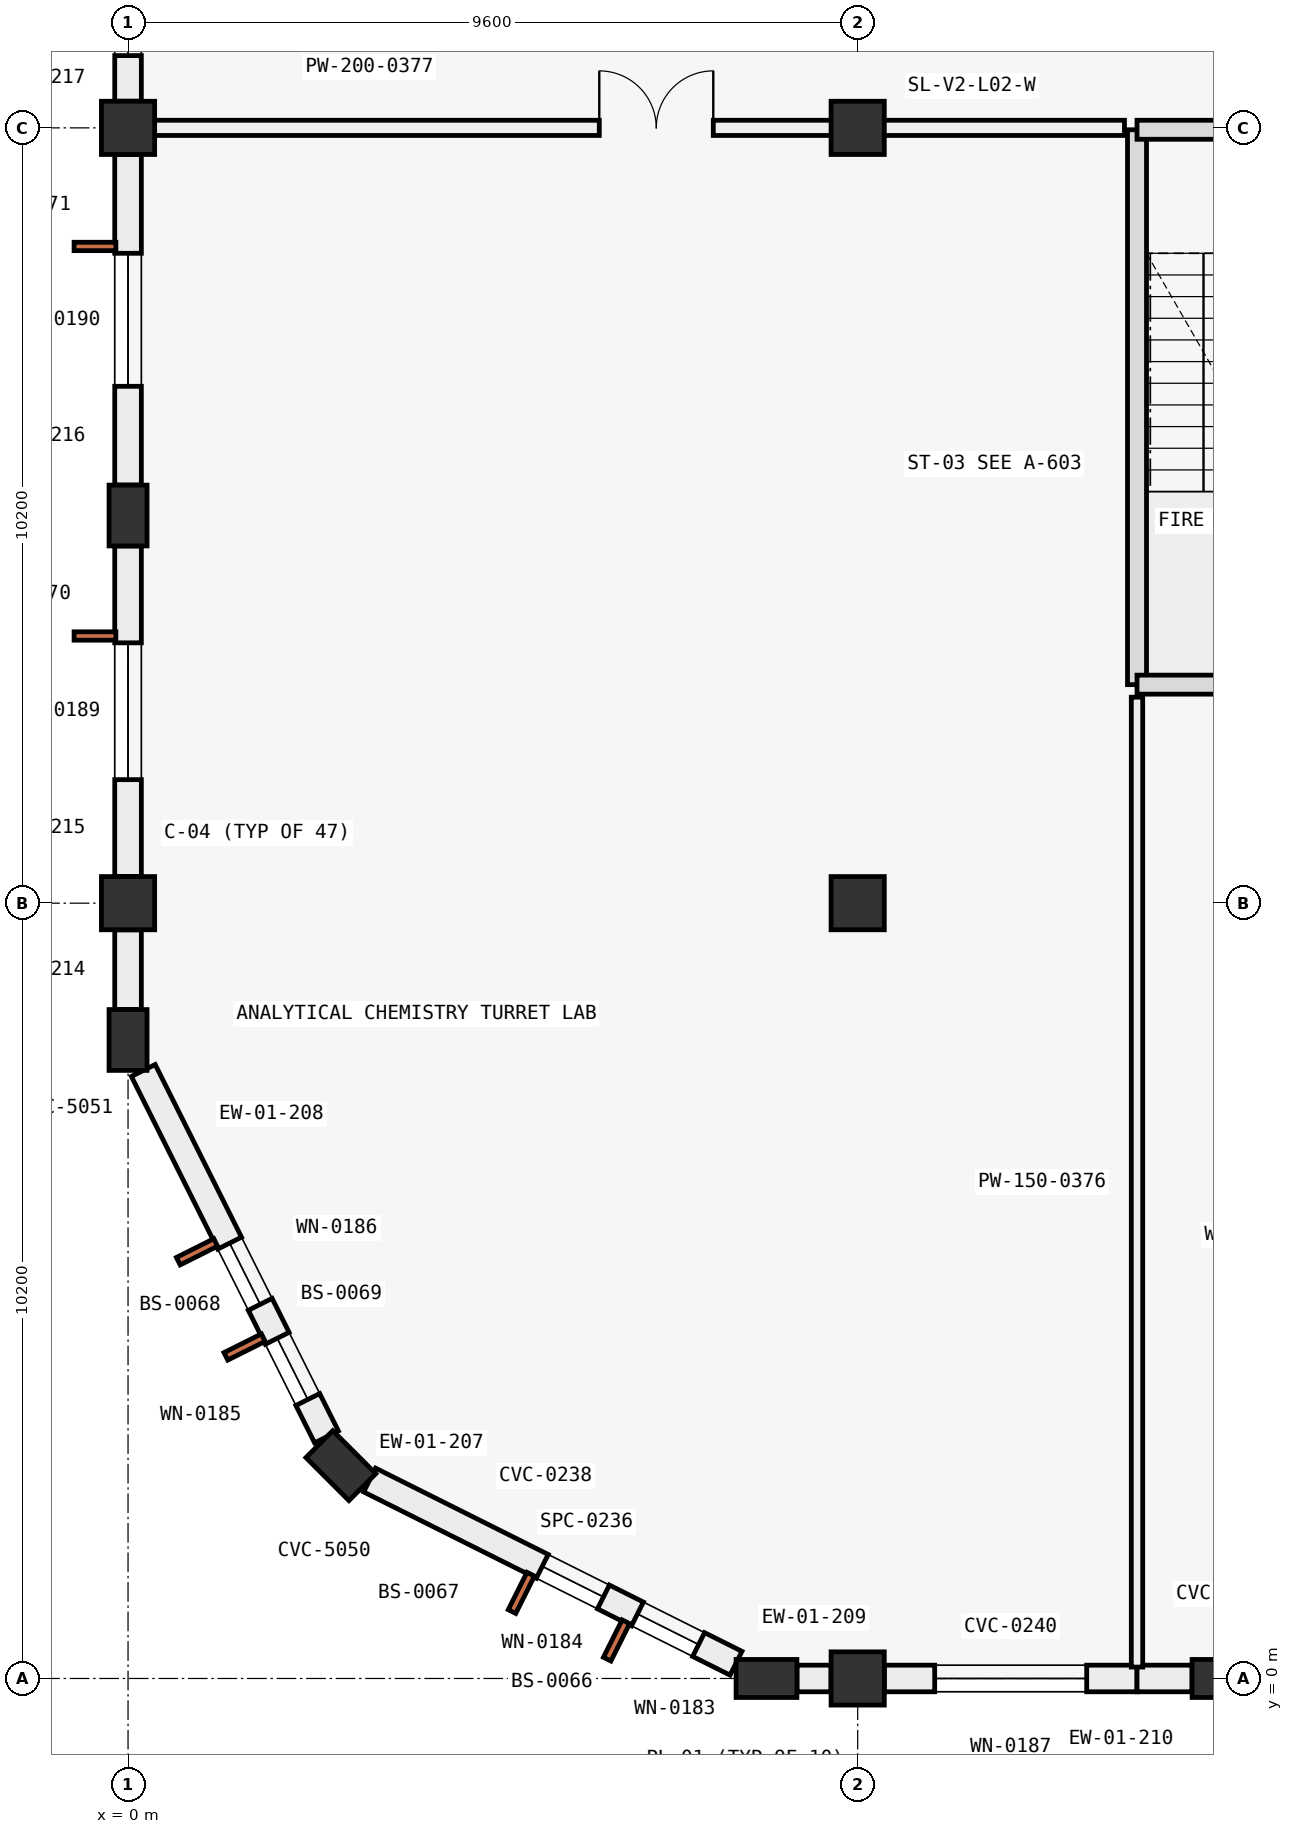
"""IFC4 building model, lengths in metres.
Left out: names, types, materials, properties, quantities, classifications, styles, units other than length and angle.
Written with IfcOpenShell. Run it as: python <this file> out.ifc"""

import sys

from ifc_helpers import new_model, si_unit, direction, frame, frame_2d, origin, origin_2d, place, context, subcontext, project, spatial, rectangle, extrude, element, fill, save


model = new_model("IFC4")
c1 = context("Model", 3, precision=1e-05, world=origin(), true_north=direction((0.0, 1.0)))
c2 = subcontext(c1, "Body", "Model", "MODEL_VIEW")
j1 = project(units=[si_unit("LENGTHUNIT", "METRE"), si_unit("PLANEANGLEUNIT", "RADIAN")], contexts=[c1])
p1 = place(None, origin())
s1 = spatial("IfcSite", under=j1, at=p1, CompositionType="ELEMENT")
p2 = place(p1, origin())
s2 = spatial("IfcBuilding", under=s1, at=p2, CompositionType="ELEMENT")
p3 = place(p2, frame((0.0, 0.0, 9.6)))
s3 = spatial("IfcBuildingStorey", under=s2, at=p3, CompositionType="ELEMENT", Elevation=9.6)
for number, where, z_axis, x_axis in (
    (1, (0.0, 10.2, 0.0), (0.0, 0.0, 1.0), (1.0, 0.0, 0.0)),
    (2, (0.0, 20.4, 0.0), (0.0, 0.0, 1.0), (1.0, 0.0, 0.0)),
    (3, (9.6, 0.0, 0.0), (0.0, 0.0, 1.0), (1.0, 0.0, 0.0)),
    (4, (9.6, 10.2, 0.0), (0.0, 0.0, 1.0), (1.0, 0.0, 0.0)),
    (5, (9.6, 20.4, 0.0), (0.0, 0.0, 1.0), (1.0, 0.0, 0.0)),
):
    element("IfcColumn", number, at=place(p3, frame(where, z_axis=z_axis, x_axis=x_axis)), inside=s3, PredefinedType="COLUMN", context=c2, shape_type="SweptSolid", body=[
        extrude(rectangle(XDim=0.7, YDim=0.7, at=origin_2d()), origin(), (0.0, 0.0, 1.0), 4.2),
    ])
for number, where, z_axis, x_axis in (
    (6, (8.4, 0.0, 0.0), (0.0, 0.0, 1.0), (0.0, 1.0, 0.0)),
    (7, (2.8, 2.8, 0.0), (0.0, 0.0, 1.0), (0.707, 0.707, 0.0)),
    (8, (0.0, 8.4, 0.0), (0.0, 0.0, 1.0), (1.0, 0.0, 0.0)),
    (9, (14.4, 0.0, 0.0), (0.0, 0.0, 1.0), (0.0, 1.0, 0.0)),
    (10, (0.0, 15.3, 0.0), (0.0, 0.0, 1.0), (1.0, 0.0, 0.0)),
):
    element("IfcColumn", number, at=place(p3, frame(where, z_axis=z_axis, x_axis=x_axis)), inside=s3, PredefinedType="PILASTER", context=c2, shape_type="SweptSolid", body=[
        extrude(rectangle(XDim=0.5, YDim=0.8, at=origin_2d()), origin(), (0.0, 0.0, 1.0), 4.2),
    ])
p4 = place(p3, frame((7.999, 0.2, 0.0), z_axis=(0.0, 0.0, 1.0), x_axis=(-0.894418132042, 0.447231712958, 0.0)))
e11 = element("IfcWall", 11, at=p4, inside=s3, PredefinedType="SOLIDWALL", context=c2, shape_type="SweptSolid", body=[
    extrude(rectangle(XDim=5.39, YDim=0.35, at=frame_2d((2.695, 0.0))), origin(), (0.0, 0.0, 1.0), 3.23),
])
p5 = place(p4, frame((0.55, 0.0, 0.7)))
e12 = element("IfcOpeningElement", 12, at=p5, cuts=e11, PredefinedType="OPENING", context=c2, shape_type="SweptSolid", body=[
    extrude(rectangle(XDim=0.9, YDim=2.2, at=frame_2d((0.45, 1.1))), frame((0.0, 0.185, 0.0), z_axis=(0.0, -1.0, 0.0), x_axis=(1.0, 0.0, 0.0)), (0.0, 0.0, 1.0), 0.37),
])
p6 = place(p4, frame((1.95, 0.0, 0.7)))
e13 = element("IfcOpeningElement", 13, at=p6, cuts=e11, PredefinedType="OPENING", context=c2, shape_type="SweptSolid", body=[
    extrude(rectangle(XDim=0.9, YDim=2.2, at=frame_2d((0.45, 1.1))), frame((0.0, 0.185, 0.0), z_axis=(0.0, -1.0, 0.0), x_axis=(1.0, 0.0, 0.0)), (0.0, 0.0, 1.0), 0.37),
])
p7 = place(p3, frame((2.611, 3.178, 0.0), z_axis=(0.0, 0.0, 1.0), x_axis=(-0.447231712958, 0.894418132042, 0.0)))
e14 = element("IfcWall", 14, at=p7, inside=s3, PredefinedType="SOLIDWALL", context=c2, shape_type="SweptSolid", body=[
    extrude(rectangle(XDim=5.39, YDim=0.35, at=frame_2d((2.695, 0.0))), origin(), (0.0, 0.0, 1.0), 3.23),
])
p8 = place(p7, frame((0.55, 0.0, 0.7)))
e15 = element("IfcOpeningElement", 15, at=p8, cuts=e14, PredefinedType="OPENING", context=c2, shape_type="SweptSolid", body=[
    extrude(rectangle(XDim=0.9, YDim=2.2, at=frame_2d((0.45, 1.1))), frame((0.0, 0.185, 0.0), z_axis=(0.0, -1.0, 0.0), x_axis=(1.0, 0.0, 0.0)), (0.0, 0.0, 1.0), 0.37),
])
p9 = place(p7, frame((1.95, 0.0, 0.7)))
e16 = element("IfcOpeningElement", 16, at=p9, cuts=e14, PredefinedType="OPENING", context=c2, shape_type="SweptSolid", body=[
    extrude(rectangle(XDim=0.9, YDim=2.2, at=frame_2d((0.45, 1.1))), frame((0.0, 0.185, 0.0), z_axis=(0.0, -1.0, 0.0), x_axis=(1.0, 0.0, 0.0)), (0.0, 0.0, 1.0), 0.37),
])
p10 = place(p3, frame((9.249, 0.0, 0.0), z_axis=(0.0, 0.0, 1.0), x_axis=(-1.0, 0.0, 0.0)))
e17 = element("IfcWall", 17, at=p10, inside=s3, PredefinedType="SOLIDWALL", context=c2, shape_type="SweptSolid", body=[
    extrude(rectangle(XDim=0.448, YDim=0.35, at=frame_2d((0.224, 0.0))), origin(), (0.0, 0.0, 1.0), 3.28),
])
p11 = place(p3, frame((13.275, 0.0, 0.0), z_axis=(0.0, 0.0, 1.0), x_axis=(-1.0, 0.0, 0.0)))
e18 = element("IfcWall", 18, at=p11, inside=s3, PredefinedType="SOLIDWALL", context=c2, shape_type="SweptSolid", body=[
    extrude(rectangle(XDim=3.324, YDim=0.35, at=frame_2d((1.662, 0.0))), origin(), (0.0, 0.0, 1.0), 2.58),
])
p12 = place(p11, frame((0.662, 0.0, 0.8)))
e19 = element("IfcOpeningElement", 19, at=p12, cuts=e18, PredefinedType="OPENING", context=c2, shape_type="SweptSolid", body=[
    extrude(rectangle(XDim=2.0, YDim=1.35, at=frame_2d((1.0, 0.675))), frame((0.0, 0.185, 0.0), z_axis=(0.0, -1.0, 0.0), x_axis=(1.0, 0.0, 0.0)), (0.0, 0.0, 1.0), 0.37),
])
p13 = place(p3, frame((13.999, 0.0, 0.0), z_axis=(0.0, 0.0, 1.0), x_axis=(-1.0, 0.0, 0.0)))
e20 = element("IfcWall", 20, at=p13, inside=s3, PredefinedType="SOLIDWALL", context=c2, shape_type="SweptSolid", body=[
    extrude(rectangle(XDim=0.724, YDim=0.35, at=frame_2d((0.362, 0.0))), origin(), (0.0, 0.0, 1.0), 2.58),
])
p14 = place(p3, frame((0.0, 8.801, 0.0), z_axis=(0.0, 0.0, 1.0), x_axis=(0.0, 1.0, 0.0)))
e21 = element("IfcWall", 21, at=p14, inside=s3, PredefinedType="SOLIDWALL", context=c2, shape_type="SweptSolid", body=[
    extrude(rectangle(XDim=1.048, YDim=0.35, at=frame_2d((0.524, 0.0))), origin(), (0.0, 0.0, 1.0), 3.28),
])
p15 = place(p3, frame((0.0, 10.551, 0.0), z_axis=(0.0, 0.0, 1.0), x_axis=(0.0, 1.0, 0.0)))
e22 = element("IfcWall", 22, at=p15, inside=s3, PredefinedType="SOLIDWALL", context=c2, shape_type="SweptSolid", body=[
    extrude(rectangle(XDim=4.348, YDim=0.35, at=frame_2d((2.174, 0.0))), origin(), (0.0, 0.0, 1.0), 3.28),
])
p16 = place(p15, frame((1.274, 0.0, 0.85)))
e23 = element("IfcOpeningElement", 23, at=p16, cuts=e22, PredefinedType="OPENING", context=c2, shape_type="SweptSolid", body=[
    extrude(rectangle(XDim=1.8, YDim=2.1, at=frame_2d((0.9, 1.05))), frame((0.0, 0.185, 0.0), z_axis=(0.0, -1.0, 0.0), x_axis=(1.0, 0.0, 0.0)), (0.0, 0.0, 1.0), 0.37),
])
p17 = place(p3, frame((0.0, 15.701, 0.0), z_axis=(0.0, 0.0, 1.0), x_axis=(0.0, 1.0, 0.0)))
e24 = element("IfcWall", 24, at=p17, inside=s3, PredefinedType="SOLIDWALL", context=c2, shape_type="SweptSolid", body=[
    extrude(rectangle(XDim=4.348, YDim=0.35, at=frame_2d((2.174, 0.0))), origin(), (0.0, 0.0, 1.0), 3.28),
])
p18 = place(p17, frame((1.299, 0.0, 0.85)))
e25 = element("IfcOpeningElement", 25, at=p18, cuts=e24, PredefinedType="OPENING", context=c2, shape_type="SweptSolid", body=[
    extrude(rectangle(XDim=1.75, YDim=2.05, at=frame_2d((0.875, 1.025))), frame((0.0, 0.185, 0.0), z_axis=(0.0, -1.0, 0.0), x_axis=(1.0, 0.0, 0.0)), (0.0, 0.0, 1.0), 0.37),
])
p19 = place(p3, frame((0.0, 20.751, 0.0), z_axis=(0.0, 0.0, 1.0), x_axis=(0.0, 1.0, 0.0)))
e26 = element("IfcWall", 26, at=p19, inside=s3, PredefinedType="SOLIDWALL", context=c2, shape_type="SweptSolid", body=[
    extrude(rectangle(XDim=3.199, YDim=0.35, at=frame_2d((1.6, 0.0))), origin(), (0.0, 0.0, 1.0), 3.28),
])
p20 = place(p19, frame((0.6, 0.0, 0.75)))
e27 = element("IfcOpeningElement", 27, at=p20, cuts=e26, PredefinedType="OPENING", context=c2, shape_type="SweptSolid", body=[
    extrude(rectangle(XDim=2.0, YDim=1.35, at=frame_2d((1.0, 0.675))), frame((0.0, 0.185, 0.0), z_axis=(0.0, -1.0, 0.0), x_axis=(1.0, 0.0, 0.0)), (0.0, 0.0, 1.0), 0.37),
])
p21 = place(p3, frame((13.275, 20.375, 0.0), z_axis=(0.0, 0.0, 1.0), x_axis=(0.0, -1.0, 0.0)))
e28 = element("IfcWall", 28, at=p21, inside=s3, PredefinedType="SOLIDWALL", context=c2, shape_type="SweptSolid", body=[
    extrude(rectangle(XDim=7.3, YDim=0.25, at=frame_2d((3.65, 0.0))), origin(), (0.0, 0.0, 1.0), 3.95),
])
p22 = place(p3, frame((13.275, 13.075, 0.0), z_axis=(0.0, 0.0, 1.0), x_axis=(1.0, 0.0, 0.0)))
e29 = element("IfcWall", 29, at=p22, inside=s3, PredefinedType="SOLIDWALL", context=c2, shape_type="SweptSolid", body=[
    extrude(rectangle(XDim=3.45, YDim=0.25, at=frame_2d((1.725, 0.0))), origin(), (0.0, 0.0, 1.0), 3.95),
])
p23 = place(p3, frame((16.725, 20.375, 0.0), z_axis=(0.0, 0.0, 1.0), x_axis=(-1.0, 0.0, 0.0)))
e30 = element("IfcWall", 30, at=p23, inside=s3, PredefinedType="SOLIDWALL", context=c2, shape_type="SweptSolid", body=[
    extrude(rectangle(XDim=3.45, YDim=0.25, at=frame_2d((1.725, 0.0))), origin(), (0.0, 0.0, 1.0), 3.95),
])
p24 = place(p23, frame((1.175, 0.0, 0.0)))
e31 = element("IfcOpeningElement", 31, at=p24, cuts=e30, PredefinedType="OPENING", context=c2, shape_type="SweptSolid", body=[
    extrude(rectangle(XDim=1.1, YDim=2.2, at=frame_2d((0.55, 1.1))), frame((0.0, 0.135, 0.0), z_axis=(0.0, -1.0, 0.0), x_axis=(1.0, 0.0, 0.0)), (0.0, 0.0, 1.0), 0.27),
])
p25 = place(p3, frame((13.275, 0.15, 0.0), z_axis=(0.0, 0.0, 1.0), x_axis=(0.0, 1.0, 0.0)))
e32 = element("IfcWall", 32, at=p25, inside=s3, PredefinedType="PARTITIONING", context=c2, shape_type="SweptSolid", body=[
    extrude(rectangle(XDim=12.76, YDim=0.15, at=frame_2d((6.38, 0.0))), origin(), (0.0, 0.0, 1.0), 3.33),
])
p26 = place(p3, frame((0.15, 20.4, 0.0), z_axis=(0.0, 0.0, 1.0), x_axis=(1.0, 0.0, 0.0)))
e33 = element("IfcWall", 33, at=p26, inside=s3, PredefinedType="PARTITIONING", context=c2, shape_type="SweptSolid", body=[
    extrude(rectangle(XDim=12.96, YDim=0.2, at=frame_2d((6.48, 0.0))), origin(), (0.0, 0.0, 1.0), 3.28),
])
p27 = place(p26, frame((6.05, 0.0, 0.0)))
e34 = element("IfcOpeningElement", 34, at=p27, cuts=e33, PredefinedType="OPENING", context=c2, shape_type="SweptSolid", body=[
    extrude(rectangle(XDim=1.5, YDim=2.2, at=frame_2d((0.75, 1.1))), frame((0.0, 0.11, 0.0), z_axis=(0.0, -1.0, 0.0), x_axis=(1.0, 0.0, 0.0)), (0.0, 0.0, 1.0), 0.22),
])
p28 = place(p5, origin())
e35 = element("IfcWindow", 35, at=p28, inside=s3, PartitioningType="SINGLE_PANEL", PredefinedType="WINDOW", context=c2, shape_type="SweptSolid", body=[
    extrude(rectangle(XDim=0.9, YDim=2.2, at=frame_2d((0.45, 1.1))), frame((0.0, 0.03, 0.0), z_axis=(0.0, -1.0, 0.0), x_axis=(1.0, 0.0, 0.0)), (0.0, 0.0, 1.0), 0.06),
])
fill(e12, e35)
p29 = place(p6, origin())
e36 = element("IfcWindow", 36, at=p29, inside=s3, PartitioningType="SINGLE_PANEL", PredefinedType="WINDOW", context=c2, shape_type="SweptSolid", body=[
    extrude(rectangle(XDim=0.9, YDim=2.2, at=frame_2d((0.45, 1.1))), frame((0.0, 0.03, 0.0), z_axis=(0.0, -1.0, 0.0), x_axis=(1.0, 0.0, 0.0)), (0.0, 0.0, 1.0), 0.06),
])
fill(e13, e36)
p30 = place(p8, origin())
e37 = element("IfcWindow", 37, at=p30, inside=s3, PartitioningType="SINGLE_PANEL", PredefinedType="WINDOW", context=c2, shape_type="SweptSolid", body=[
    extrude(rectangle(XDim=0.9, YDim=2.2, at=frame_2d((0.45, 1.1))), frame((0.0, 0.03, 0.0), z_axis=(0.0, -1.0, 0.0), x_axis=(1.0, 0.0, 0.0)), (0.0, 0.0, 1.0), 0.06),
])
fill(e15, e37)
p31 = place(p9, origin())
e38 = element("IfcWindow", 38, at=p31, inside=s3, PartitioningType="SINGLE_PANEL", PredefinedType="WINDOW", context=c2, shape_type="SweptSolid", body=[
    extrude(rectangle(XDim=0.9, YDim=2.2, at=frame_2d((0.45, 1.1))), frame((0.0, 0.03, 0.0), z_axis=(0.0, -1.0, 0.0), x_axis=(1.0, 0.0, 0.0)), (0.0, 0.0, 1.0), 0.06),
])
fill(e16, e38)
p32 = place(p12, origin())
e39 = element("IfcWindow", 39, at=p32, inside=s3, PartitioningType="SINGLE_PANEL", PredefinedType="WINDOW", context=c2, shape_type="SweptSolid", body=[
    extrude(rectangle(XDim=2.0, YDim=1.35, at=frame_2d((1.0, 0.675))), frame((0.0, 0.03, 0.0), z_axis=(0.0, -1.0, 0.0), x_axis=(1.0, 0.0, 0.0)), (0.0, 0.0, 1.0), 0.06),
])
fill(e19, e39)
p33 = place(p16, origin())
e40 = element("IfcWindow", 40, at=p33, inside=s3, PartitioningType="SINGLE_PANEL", PredefinedType="WINDOW", context=c2, shape_type="SweptSolid", body=[
    extrude(rectangle(XDim=1.8, YDim=2.1, at=frame_2d((0.9, 1.05))), frame((0.0, 0.03, 0.0), z_axis=(0.0, -1.0, 0.0), x_axis=(1.0, 0.0, 0.0)), (0.0, 0.0, 1.0), 0.06),
])
fill(e23, e40)
p34 = place(p18, origin())
e41 = element("IfcWindow", 41, at=p34, inside=s3, PartitioningType="SINGLE_PANEL", PredefinedType="WINDOW", context=c2, shape_type="SweptSolid", body=[
    extrude(rectangle(XDim=1.75, YDim=2.05, at=frame_2d((0.875, 1.025))), frame((0.0, 0.03, 0.0), z_axis=(0.0, -1.0, 0.0), x_axis=(1.0, 0.0, 0.0)), (0.0, 0.0, 1.0), 0.06),
])
fill(e25, e41)
p35 = place(p20, origin())
e42 = element("IfcWindow", 42, at=p35, inside=s3, PartitioningType="SINGLE_PANEL", PredefinedType="WINDOW", context=c2, shape_type="SweptSolid", body=[
    extrude(rectangle(XDim=2.0, YDim=1.35, at=frame_2d((1.0, 0.675))), frame((0.0, 0.03, 0.0), z_axis=(0.0, -1.0, 0.0), x_axis=(1.0, 0.0, 0.0)), (0.0, 0.0, 1.0), 0.06),
])
fill(e27, e42)
p36 = place(p27, origin())
e43 = element("IfcDoor", 43, at=p36, inside=s3, OperationType="DOUBLE_DOOR_SINGLE_SWING", PredefinedType="DOOR", context=c2, shape_type="SweptSolid", body=[
    extrude(rectangle(XDim=1.5, YDim=2.2, at=frame_2d((0.75, 1.1))), frame((0.0, 0.025, 0.0), z_axis=(0.0, -1.0, 0.0), x_axis=(1.0, 0.0, 0.0)), (0.0, 0.0, 1.0), 0.05),
])
fill(e34, e43)
save(model, sys.argv[1])
